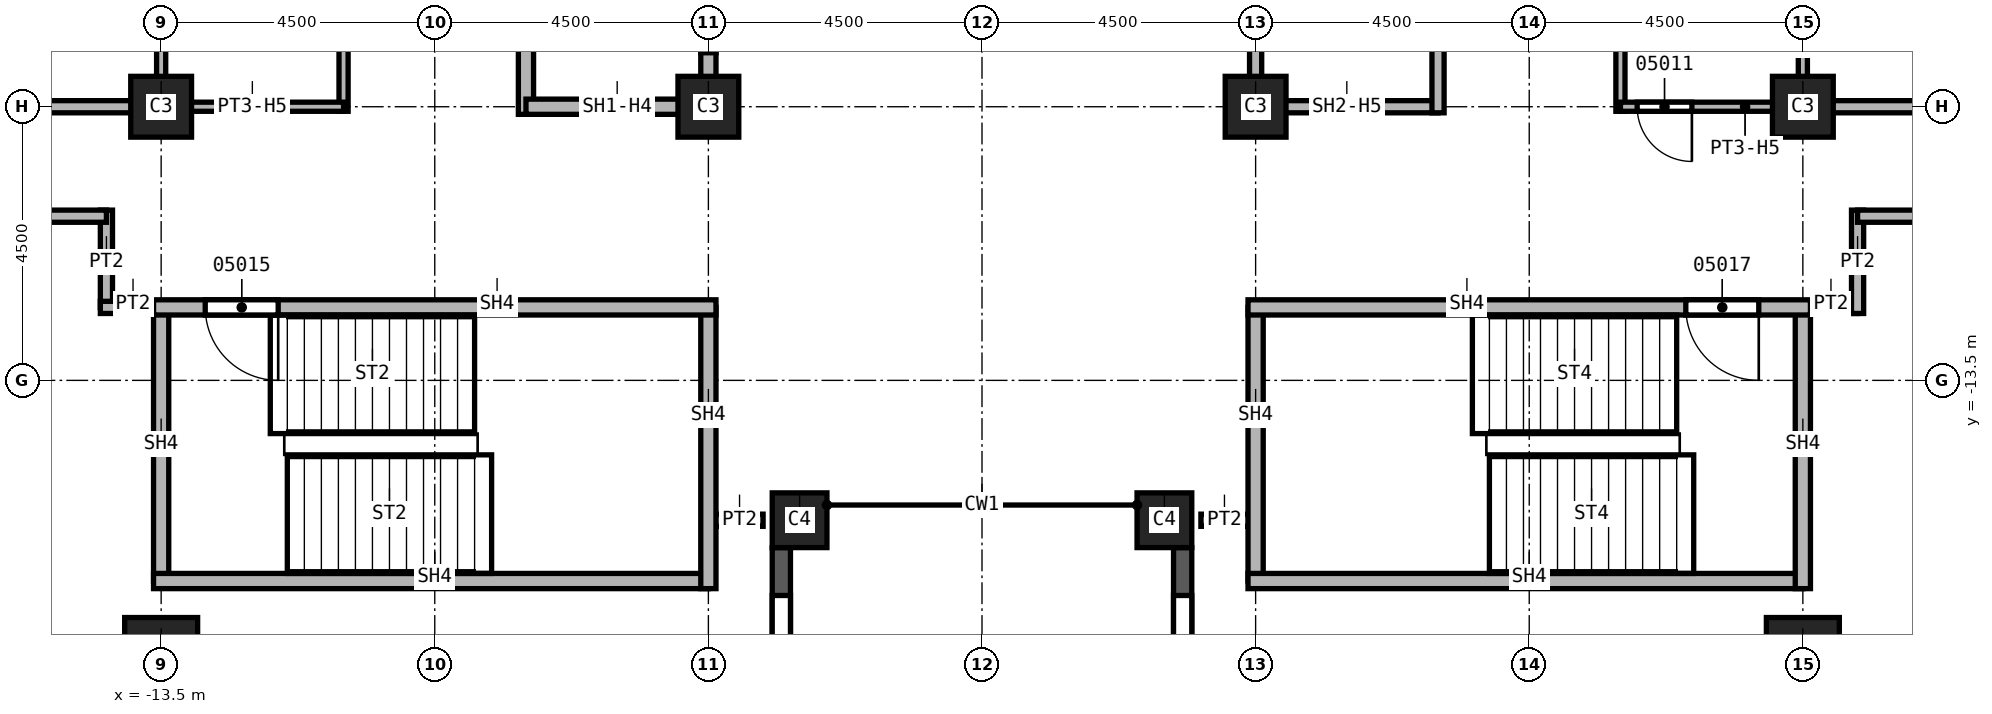
"""IFC4 building model, lengths in metres.
Left out: names, types, materials, properties, quantities, classifications, styles, units other than length and angle.
Written with IfcOpenShell. Run it as: python <this file> out.ifc"""

import sys

from ifc_helpers import new_model, si_unit, direction, frame, frame_2d, origin, origin_2d, place, context, subcontext, project, spatial, rectangle, extrude, element, fill, save


model = new_model("IFC4")
c1 = context("Model", 3, precision=1e-05, world=origin(), true_north=direction((0.0, 1.0)))
c2 = subcontext(c1, "Body", "Model", "MODEL_VIEW")
j1 = project(units=[si_unit("LENGTHUNIT", "METRE"), si_unit("PLANEANGLEUNIT", "RADIAN")], contexts=[c1])
p1 = place(None, origin())
s1 = spatial("IfcSite", under=j1, at=p1, CompositionType="ELEMENT")
p2 = place(p1, origin())
s2 = spatial("IfcBuilding", under=s1, at=p2, CompositionType="ELEMENT")
p3 = place(p2, frame((0.0, 0.0, 112.0)))
s3 = spatial("IfcBuildingStorey", under=s2, at=p3, CompositionType="ELEMENT", Elevation=112.0)
for number, where, z_axis, x_axis in (
    (1, (13.5, -18.0, 0.0), (0.0, 0.0, 1.0), (1.0, 0.0, 0.0)),
    (2, (-13.5, -18.0, 0.0), (0.0, 0.0, 1.0), (1.0, 0.0, 0.0)),
):
    element("IfcColumn", number, at=place(p3, frame(where, z_axis=z_axis, x_axis=x_axis)), inside=s3, PredefinedType="COLUMN", context=c2, shape_type="SweptSolid", body=[
        extrude(rectangle(XDim=1.2, YDim=1.2, at=origin_2d()), origin(), (0.0, 0.0, 1.0), 3.7),
    ])
for number, where, z_axis, x_axis in (
    (3, (4.5, -9.0, 0.0), (0.0, 0.0, 1.0), (1.0, 0.0, 0.0)),
    (4, (13.5, -9.0, 0.0), (0.0, 0.0, 1.0), (1.0, 0.0, 0.0)),
    (5, (-4.5, -9.0, 0.0), (0.0, 0.0, 1.0), (1.0, 0.0, 0.0)),
    (6, (-13.5, -9.0, 0.0), (0.0, 0.0, 1.0), (1.0, 0.0, 0.0)),
):
    element("IfcColumn", number, at=place(p3, frame(where, z_axis=z_axis, x_axis=x_axis)), inside=s3, PredefinedType="COLUMN", context=c2, shape_type="SweptSolid", body=[
        extrude(rectangle(XDim=1.0, YDim=1.0, at=origin_2d()), origin(), (0.0, 0.0, 1.0), 3.7),
    ])
for number, where, z_axis, x_axis in (
    (7, (3.0, -15.8, 0.0), (0.0, 0.0, 1.0), (1.0, 0.0, 0.0)),
    (8, (-3.0, -15.8, 0.0), (0.0, 0.0, 1.0), (1.0, 0.0, 0.0)),
):
    element("IfcColumn", number, at=place(p3, frame(where, z_axis=z_axis, x_axis=x_axis)), inside=s3, PredefinedType="COLUMN", context=c2, shape_type="SweptSolid", body=[
        extrude(rectangle(XDim=0.9, YDim=0.9, at=origin_2d()), origin(), (0.0, 0.0, 1.0), 3.7),
    ])
p4 = place(p3, frame((-3.3, -24.2, 0.0), z_axis=(0.0, 0.0, 1.0), x_axis=(0.0, 1.0, 0.0)))
e9 = element("IfcWall", 9, at=p4, inside=s3, PredefinedType="SOLIDWALL", context=c2, shape_type="SweptSolid", body=[
    extrude(rectangle(XDim=7.95, YDim=0.3, at=frame_2d((3.975, 0.0))), origin(), (0.0, 0.0, 1.0), 3.1),
])
p5 = place(p4, frame((0.788, 0.0, 0.8)))
e10 = element("IfcOpeningElement", 10, at=p5, cuts=e9, PredefinedType="OPENING", context=c2, shape_type="SweptSolid", body=[
    extrude(rectangle(XDim=2.4, YDim=1.95, at=frame_2d((1.2, 0.975))), frame((0.0, 0.15, 0.0), z_axis=(0.0, -1.0, 0.0), x_axis=(1.0, 0.0, 0.0)), (0.0, 0.0, 1.0), 0.3),
])
p6 = place(p4, frame((4.762, 0.0, 0.8)))
e11 = element("IfcOpeningElement", 11, at=p6, cuts=e9, PredefinedType="OPENING", context=c2, shape_type="SweptSolid", body=[
    extrude(rectangle(XDim=2.4, YDim=1.95, at=frame_2d((1.2, 0.975))), frame((0.0, 0.15, 0.0), z_axis=(0.0, -1.0, 0.0), x_axis=(1.0, 0.0, 0.0)), (0.0, 0.0, 1.0), 0.3),
])
p7 = place(p3, frame((3.3, -16.25, 0.0), z_axis=(0.0, 0.0, 1.0), x_axis=(0.0, -1.0, 0.0)))
e12 = element("IfcWall", 12, at=p7, inside=s3, PredefinedType="SOLIDWALL", context=c2, shape_type="SweptSolid", body=[
    extrude(rectangle(XDim=7.95, YDim=0.3, at=frame_2d((3.975, 0.0))), origin(), (0.0, 0.0, 1.0), 3.1),
])
p8 = place(p7, frame((0.788, 0.0, 0.8)))
e13 = element("IfcOpeningElement", 13, at=p8, cuts=e12, PredefinedType="OPENING", context=c2, shape_type="SweptSolid", body=[
    extrude(rectangle(XDim=2.4, YDim=1.95, at=frame_2d((1.2, 0.975))), frame((0.0, 0.15, 0.0), z_axis=(0.0, -1.0, 0.0), x_axis=(1.0, 0.0, 0.0)), (0.0, 0.0, 1.0), 0.3),
])
p9 = place(p7, frame((4.762, 0.0, 0.8)))
e14 = element("IfcOpeningElement", 14, at=p9, cuts=e12, PredefinedType="OPENING", context=c2, shape_type="SweptSolid", body=[
    extrude(rectangle(XDim=2.4, YDim=1.95, at=frame_2d((1.2, 0.975))), frame((0.0, 0.15, 0.0), z_axis=(0.0, -1.0, 0.0), x_axis=(1.0, 0.0, 0.0)), (0.0, 0.0, 1.0), 0.3),
])
p10 = place(p3, frame((-18.0, -9.0, 0.0), z_axis=(0.0, 0.0, 1.0), x_axis=(1.0, 0.0, 0.0)))
e15 = element("IfcWall", 15, at=p10, inside=s3, PredefinedType="PARTITIONING", context=c2, shape_type="SweptSolid", body=[
    extrude(rectangle(XDim=4.5, YDim=0.2, at=frame_2d((2.25, 0.0))), origin(), (0.0, 0.0, 1.0), 3.7),
])
p11 = place(p3, frame((-14.4, -12.3, 0.0), z_axis=(0.0, 0.0, 1.0), x_axis=(0.0, 1.0, 0.0)))
e16 = element("IfcWall", 16, at=p11, inside=s3, PredefinedType="PARTITIONING", context=c2, shape_type="SweptSolid", body=[
    extrude(rectangle(XDim=1.6, YDim=0.2, at=frame_2d((0.8, 0.0))), origin(), (0.0, 0.0, 1.0), 3.7),
])
p12 = place(p3, frame((-14.4, -10.8, 0.0), z_axis=(0.0, 0.0, 1.0), x_axis=(-1.0, 0.0, 0.0)))
e17 = element("IfcWall", 17, at=p12, inside=s3, PredefinedType="PARTITIONING", context=c2, shape_type="SweptSolid", body=[
    extrude(rectangle(XDim=3.6, YDim=0.2, at=frame_2d((1.8, 0.0))), origin(), (0.0, 0.0, 1.0), 3.7),
])
p13 = place(p3, frame((-13.375, -12.3, 0.0), z_axis=(0.0, 0.0, 1.0), x_axis=(-1.0, 0.0, 0.0)))
e18 = element("IfcWall", 18, at=p13, inside=s3, PredefinedType="PARTITIONING", context=c2, shape_type="SweptSolid", body=[
    extrude(rectangle(XDim=1.125, YDim=0.2, at=frame_2d((0.562, 0.0))), origin(), (0.0, 0.0, 1.0), 3.7),
])
for number, where, z_axis, x_axis in (
    (19, (-3.6, -15.8, 0.0), (0.0, 0.0, 1.0), (-1.0, 0.0, 0.0)),
    (20, (4.5, -15.8, 0.0), (0.0, 0.0, 1.0), (-1.0, 0.0, 0.0)),
):
    element("IfcWall", number, at=place(p3, frame(where, z_axis=z_axis, x_axis=x_axis)), inside=s3, PredefinedType="PARTITIONING", context=c2, shape_type="SweptSolid", body=[
        extrude(rectangle(XDim=0.9, YDim=0.2, at=frame_2d((0.45, 0.0))), origin(), (0.0, 0.0, 1.0), 3.7),
    ])
p14 = place(p3, frame((13.5, -9.0, 0.0), z_axis=(0.0, 0.0, 1.0), x_axis=(1.0, 0.0, 0.0)))
e21 = element("IfcWall", 21, at=p14, inside=s3, PredefinedType="PARTITIONING", context=c2, shape_type="SweptSolid", body=[
    extrude(rectangle(XDim=4.5, YDim=0.2, at=frame_2d((2.25, 0.0))), origin(), (0.0, 0.0, 1.0), 3.7),
])
p15 = place(p3, frame((14.4, -12.3, 0.0), z_axis=(0.0, 0.0, 1.0), x_axis=(-1.0, 0.0, 0.0)))
e22 = element("IfcWall", 22, at=p15, inside=s3, PredefinedType="PARTITIONING", context=c2, shape_type="SweptSolid", body=[
    extrude(rectangle(XDim=1.025, YDim=0.2, at=frame_2d((0.512, 0.0))), origin(), (0.0, 0.0, 1.0), 3.7),
])
p16 = place(p3, frame((14.4, -10.7, 0.0), z_axis=(0.0, 0.0, 1.0), x_axis=(0.0, -1.0, 0.0)))
e23 = element("IfcWall", 23, at=p16, inside=s3, PredefinedType="PARTITIONING", context=c2, shape_type="SweptSolid", body=[
    extrude(rectangle(XDim=1.7, YDim=0.2, at=frame_2d((0.85, 0.0))), origin(), (0.0, 0.0, 1.0), 3.7),
])
p17 = place(p3, frame((18.0, -10.8, 0.0), z_axis=(0.0, 0.0, 1.0), x_axis=(-1.0, 0.0, 0.0)))
e24 = element("IfcWall", 24, at=p17, inside=s3, PredefinedType="PARTITIONING", context=c2, shape_type="SweptSolid", body=[
    extrude(rectangle(XDim=3.6, YDim=0.2, at=frame_2d((1.8, 0.0))), origin(), (0.0, 0.0, 1.0), 3.7),
])
p18 = place(p3, frame((4.5, -9.1, 0.0), z_axis=(0.0, 0.0, 1.0), x_axis=(0.0, 1.0, 0.0)))
e25 = element("IfcWall", 25, at=p18, inside=s3, PredefinedType="SOLIDWALL", context=c2, shape_type="SweptSolid", body=[
    extrude(rectangle(XDim=9.1, YDim=0.2, at=frame_2d((4.55, 0.0))), origin(), (0.0, 0.0, 1.0), 2.938),
])
p19 = place(p18, frame((2.2, 0.0, 0.0)))
e26 = element("IfcOpeningElement", 26, at=p19, cuts=e25, PredefinedType="OPENING", context=c2, shape_type="SweptSolid", body=[
    extrude(rectangle(XDim=1.1, YDim=2.1, at=frame_2d((0.55, 1.05))), frame((0.0, 0.1, 0.0), z_axis=(0.0, -1.0, 0.0), x_axis=(1.0, 0.0, 0.0)), (0.0, 0.0, 1.0), 0.2),
])
p20 = place(p3, frame((7.5, -9.0, 0.0), z_axis=(0.0, 0.0, 1.0), x_axis=(-1.0, 0.0, 0.0)))
e27 = element("IfcWall", 27, at=p20, inside=s3, PredefinedType="SOLIDWALL", context=c2, shape_type="SweptSolid", body=[
    extrude(rectangle(XDim=3.0, YDim=0.2, at=frame_2d((1.5, 0.0))), origin(), (0.0, 0.0, 1.0), 2.938),
])
p21 = place(p3, frame((7.5, -2.875, 0.0), z_axis=(0.0, 0.0, 1.0), x_axis=(0.0, -1.0, 0.0)))
e28 = element("IfcWall", 28, at=p21, inside=s3, PredefinedType="SOLIDWALL", context=c2, shape_type="SweptSolid", body=[
    extrude(rectangle(XDim=6.225, YDim=0.2, at=frame_2d((3.113, 0.0))), origin(), (0.0, 0.0, 1.0), 3.7),
])
p22 = place(p3, frame((-7.5, -9.125, 0.0), z_axis=(0.0, 0.0, 1.0), x_axis=(0.0, 1.0, 0.0)))
e29 = element("IfcWall", 29, at=p22, inside=s3, PredefinedType="SOLIDWALL", context=c2, shape_type="SweptSolid", body=[
    extrude(rectangle(XDim=12.25, YDim=0.25, at=frame_2d((6.125, 0.0))), origin(), (0.0, 0.0, 1.0), 3.7),
])
p23 = place(p3, frame((-4.5, -9.0, 0.0), z_axis=(0.0, 0.0, 1.0), x_axis=(-1.0, 0.0, 0.0)))
e30 = element("IfcWall", 30, at=p23, inside=s3, PredefinedType="SOLIDWALL", context=c2, shape_type="SweptSolid", body=[
    extrude(rectangle(XDim=3.0, YDim=0.25, at=frame_2d((1.5, 0.0))), origin(), (0.0, 0.0, 1.0), 2.938),
])
p24 = place(p3, frame((-4.5, 0.0, 0.0), z_axis=(0.0, 0.0, 1.0), x_axis=(0.0, -1.0, 0.0)))
e31 = element("IfcWall", 31, at=p24, inside=s3, PredefinedType="SOLIDWALL", context=c2, shape_type="SweptSolid", body=[
    extrude(rectangle(XDim=9.125, YDim=0.25, at=frame_2d((4.562, 0.0))), origin(), (0.0, 0.0, 1.0), 2.938),
])
p25 = place(p24, frame((7.012, 0.0, 0.0)))
e32 = element("IfcOpeningElement", 32, at=p25, cuts=e31, PredefinedType="OPENING", context=c2, shape_type="SweptSolid", body=[
    extrude(rectangle(XDim=1.1, YDim=2.1, at=frame_2d((0.55, 1.05))), frame((0.0, 0.125, 0.0), z_axis=(0.0, -1.0, 0.0), x_axis=(1.0, 0.0, 0.0)), (0.0, 0.0, 1.0), 0.25),
])
p26 = place(p24, frame((3.95, 0.0, 0.0)))
e33 = element("IfcOpeningElement", 33, at=p26, cuts=e31, PredefinedType="OPENING", context=c2, shape_type="SweptSolid", body=[
    extrude(rectangle(XDim=1.1, YDim=2.1, at=frame_2d((0.55, 1.05))), frame((0.0, 0.125, 0.0), z_axis=(0.0, -1.0, 0.0), x_axis=(1.0, 0.0, 0.0)), (0.0, 0.0, 1.0), 0.25),
])
p27 = place(p24, frame((0.95, 0.0, 0.0)))
e34 = element("IfcOpeningElement", 34, at=p27, cuts=e31, PredefinedType="OPENING", context=c2, shape_type="SweptSolid", body=[
    extrude(rectangle(XDim=1.1, YDim=2.1, at=frame_2d((0.55, 1.05))), frame((0.0, 0.125, 0.0), z_axis=(0.0, -1.0, 0.0), x_axis=(1.0, 0.0, 0.0)), (0.0, 0.0, 1.0), 0.25),
])
p28 = place(p3, frame((-13.5, -16.8, 0.0), z_axis=(0.0, 0.0, 1.0), x_axis=(0.0, 1.0, 0.0)))
e35 = element("IfcWall", 35, at=p28, inside=s3, PredefinedType="SOLIDWALL", context=c2, shape_type="SweptSolid", body=[
    extrude(rectangle(XDim=4.5, YDim=0.25, at=frame_2d((2.25, 0.0))), origin(), (0.0, 0.0, 1.0), 3.7),
])
p29 = place(p3, frame((-4.5, -16.8, 0.0), z_axis=(0.0, 0.0, 1.0), x_axis=(-1.0, 0.0, 0.0)))
e36 = element("IfcWall", 36, at=p29, inside=s3, PredefinedType="SOLIDWALL", context=c2, shape_type="SweptSolid", body=[
    extrude(rectangle(XDim=9.125, YDim=0.25, at=frame_2d((4.562, 0.0))), origin(), (0.0, 0.0, 1.0), 3.7),
])
p30 = place(p3, frame((-4.5, -12.3, 0.0), z_axis=(0.0, 0.0, 1.0), x_axis=(0.0, -1.0, 0.0)))
e37 = element("IfcWall", 37, at=p30, inside=s3, PredefinedType="SOLIDWALL", context=c2, shape_type="SweptSolid", body=[
    extrude(rectangle(XDim=4.625, YDim=0.25, at=frame_2d((2.312, 0.0))), origin(), (0.0, 0.0, 1.0), 3.7),
])
p31 = place(p3, frame((-4.375, -12.3, 0.0), z_axis=(0.0, 0.0, 1.0), x_axis=(-1.0, 0.0, 0.0)))
e38 = element("IfcWall", 38, at=p31, inside=s3, PredefinedType="SOLIDWALL", context=c2, shape_type="SweptSolid", body=[
    extrude(rectangle(XDim=9.25, YDim=0.25, at=frame_2d((4.625, 0.0))), origin(), (0.0, 0.0, 1.0), 3.7),
])
p32 = place(p31, frame((7.2, 0.0, 0.0)))
e39 = element("IfcOpeningElement", 39, at=p32, cuts=e38, PredefinedType="OPENING", context=c2, shape_type="SweptSolid", body=[
    extrude(rectangle(XDim=1.2, YDim=2.1, at=frame_2d((0.6, 1.05))), frame((0.0, 0.125, 0.0), z_axis=(0.0, -1.0, 0.0), x_axis=(1.0, 0.0, 0.0)), (0.0, 0.0, 1.0), 0.25),
])
p33 = place(p3, frame((4.5, -16.8, 0.0), z_axis=(0.0, 0.0, 1.0), x_axis=(0.0, 1.0, 0.0)))
e40 = element("IfcWall", 40, at=p33, inside=s3, PredefinedType="SOLIDWALL", context=c2, shape_type="SweptSolid", body=[
    extrude(rectangle(XDim=4.5, YDim=0.25, at=frame_2d((2.25, 0.0))), origin(), (0.0, 0.0, 1.0), 3.7),
])
p34 = place(p3, frame((13.5, -16.8, 0.0), z_axis=(0.0, 0.0, 1.0), x_axis=(-1.0, 0.0, 0.0)))
e41 = element("IfcWall", 41, at=p34, inside=s3, PredefinedType="SOLIDWALL", context=c2, shape_type="SweptSolid", body=[
    extrude(rectangle(XDim=9.125, YDim=0.25, at=frame_2d((4.562, 0.0))), origin(), (0.0, 0.0, 1.0), 3.7),
])
p35 = place(p3, frame((13.5, -12.3, 0.0), z_axis=(0.0, 0.0, 1.0), x_axis=(0.0, -1.0, 0.0)))
e42 = element("IfcWall", 42, at=p35, inside=s3, PredefinedType="SOLIDWALL", context=c2, shape_type="SweptSolid", body=[
    extrude(rectangle(XDim=4.625, YDim=0.25, at=frame_2d((2.312, 0.0))), origin(), (0.0, 0.0, 1.0), 3.7),
])
p36 = place(p3, frame((13.625, -12.3, 0.0), z_axis=(0.0, 0.0, 1.0), x_axis=(-1.0, 0.0, 0.0)))
e43 = element("IfcWall", 43, at=p36, inside=s3, PredefinedType="SOLIDWALL", context=c2, shape_type="SweptSolid", body=[
    extrude(rectangle(XDim=9.25, YDim=0.25, at=frame_2d((4.625, 0.0))), origin(), (0.0, 0.0, 1.0), 3.7),
])
p37 = place(p36, frame((0.85, 0.0, 0.0)))
e44 = element("IfcOpeningElement", 44, at=p37, cuts=e43, PredefinedType="OPENING", context=c2, shape_type="SweptSolid", body=[
    extrude(rectangle(XDim=1.2, YDim=2.1, at=frame_2d((0.6, 1.05))), frame((0.0, 0.125, 0.0), z_axis=(0.0, -1.0, 0.0), x_axis=(1.0, 0.0, 0.0)), (0.0, 0.0, 1.0), 0.25),
])
p38 = place(p3, frame((-13.5, -9.1, 0.0), z_axis=(0.0, 0.0, 1.0), x_axis=(0.0, 1.0, 0.0)))
e45 = element("IfcWall", 45, at=p38, inside=s3, PredefinedType="PARTITIONING", context=c2, shape_type="SweptSolid", body=[
    extrude(rectangle(XDim=4.7, YDim=0.15, at=frame_2d((2.35, 0.0))), origin(), (0.0, 0.0, 1.0), 2.938),
])
p39 = place(p3, frame((-10.5, -9.075, 0.0), z_axis=(0.0, 0.0, 1.0), x_axis=(0.0, 1.0, 0.0)))
e46 = element("IfcWall", 46, at=p39, inside=s3, PredefinedType="PARTITIONING", context=c2, shape_type="SweptSolid", body=[
    extrude(rectangle(XDim=4.65, YDim=0.15, at=frame_2d((2.325, 0.0))), origin(), (0.0, 0.0, 1.0), 3.7),
])
p40 = place(p39, frame((3.4, 0.0, 0.0)))
e47 = element("IfcOpeningElement", 47, at=p40, cuts=e46, PredefinedType="OPENING", context=c2, shape_type="SweptSolid", body=[
    extrude(rectangle(XDim=0.9, YDim=2.1, at=frame_2d((0.45, 1.05))), frame((0.0, 0.075, 0.0), z_axis=(0.0, -1.0, 0.0), x_axis=(1.0, 0.0, 0.0)), (0.0, 0.0, 1.0), 0.15),
])
p41 = place(p3, frame((-10.5, -9.0, 0.0), z_axis=(0.0, 0.0, 1.0), x_axis=(-1.0, 0.0, 0.0)))
e48 = element("IfcWall", 48, at=p41, inside=s3, PredefinedType="PARTITIONING", context=c2, shape_type="SweptSolid", body=[
    extrude(rectangle(XDim=3.075, YDim=0.15, at=frame_2d((1.538, 0.0))), origin(), (0.0, 0.0, 1.0), 2.938),
])
p42 = place(p3, frame((10.5, -6.925, 0.0), z_axis=(0.0, 0.0, 1.0), x_axis=(0.0, -1.0, 0.0)))
e49 = element("IfcWall", 49, at=p42, inside=s3, PredefinedType="PARTITIONING", context=c2, shape_type="SweptSolid", body=[
    extrude(rectangle(XDim=2.15, YDim=0.15, at=frame_2d((1.075, 0.0))), origin(), (0.0, 0.0, 1.0), 3.7),
])
p43 = place(p3, frame((13.5, -7.0, 0.0), z_axis=(0.0, 0.0, 1.0), x_axis=(0.0, -1.0, 0.0)))
e50 = element("IfcWall", 50, at=p43, inside=s3, PredefinedType="PARTITIONING", context=c2, shape_type="SweptSolid", body=[
    extrude(rectangle(XDim=2.1, YDim=0.15, at=frame_2d((1.05, 0.0))), origin(), (0.0, 0.0, 1.0), 2.938),
])
p44 = place(p3, frame((13.575, -9.0, 0.0), z_axis=(0.0, 0.0, 1.0), x_axis=(-1.0, 0.0, 0.0)))
e51 = element("IfcWall", 51, at=p44, inside=s3, PredefinedType="PARTITIONING", context=c2, shape_type="SweptSolid", body=[
    extrude(rectangle(XDim=3.075, YDim=0.15, at=frame_2d((1.538, 0.0))), origin(), (0.0, 0.0, 1.0), 2.938),
])
p45 = place(p44, frame((1.9, 0.0, 0.0)))
e52 = element("IfcOpeningElement", 52, at=p45, cuts=e51, PredefinedType="OPENING", context=c2, shape_type="SweptSolid", body=[
    extrude(rectangle(XDim=0.9, YDim=2.1, at=frame_2d((0.45, 1.05))), frame((0.0, 0.075, 0.0), z_axis=(0.0, -1.0, 0.0), x_axis=(1.0, 0.0, 0.0)), (0.0, 0.0, 1.0), 0.15),
])
p46 = place(p6, origin())
e53 = element("IfcWindow", 53, at=p46, inside=s3, PartitioningType="SINGLE_PANEL", PredefinedType="WINDOW", context=c2, shape_type="SweptSolid", body=[
    extrude(rectangle(XDim=2.4, YDim=1.95, at=frame_2d((1.2, 0.975))), frame((0.0, 0.03, 0.0), z_axis=(0.0, -1.0, 0.0), x_axis=(1.0, 0.0, 0.0)), (0.0, 0.0, 1.0), 0.06),
])
fill(e11, e53)
p47 = place(p8, origin())
e54 = element("IfcWindow", 54, at=p47, inside=s3, PartitioningType="SINGLE_PANEL", PredefinedType="WINDOW", context=c2, shape_type="SweptSolid", body=[
    extrude(rectangle(XDim=2.4, YDim=1.95, at=frame_2d((1.2, 0.975))), frame((0.0, 0.03, 0.0), z_axis=(0.0, -1.0, 0.0), x_axis=(1.0, 0.0, 0.0)), (0.0, 0.0, 1.0), 0.06),
])
fill(e13, e54)
p48 = place(p45, origin())
e55 = element("IfcDoor", 55, at=p48, inside=s3, OperationType="SINGLE_SWING_RIGHT", PredefinedType="DOOR", context=c2, shape_type="SweptSolid", body=[
    extrude(rectangle(XDim=0.9, YDim=2.1, at=frame_2d((0.45, 1.05))), frame((0.0, 0.025, 0.0), z_axis=(0.0, -1.0, 0.0), x_axis=(1.0, 0.0, 0.0)), (0.0, 0.0, 1.0), 0.05),
])
fill(e52, e55)
p49 = place(p32, origin())
e56 = element("IfcDoor", 56, at=p49, inside=s3, OperationType="SINGLE_SWING_RIGHT", PredefinedType="DOOR", context=c2, shape_type="SweptSolid", body=[
    extrude(rectangle(XDim=1.2, YDim=2.1, at=frame_2d((0.6, 1.05))), frame((0.0, 0.025, 0.0), z_axis=(0.0, -1.0, 0.0), x_axis=(1.0, 0.0, 0.0)), (0.0, 0.0, 1.0), 0.05),
])
fill(e39, e56)
p50 = place(p37, origin())
e57 = element("IfcDoor", 57, at=p50, inside=s3, OperationType="SINGLE_SWING_RIGHT", PredefinedType="DOOR", context=c2, shape_type="SweptSolid", body=[
    extrude(rectangle(XDim=1.2, YDim=2.1, at=frame_2d((0.6, 1.05))), frame((0.0, 0.025, 0.0), z_axis=(0.0, -1.0, 0.0), x_axis=(1.0, 0.0, 0.0)), (0.0, 0.0, 1.0), 0.05),
])
fill(e44, e57)
p51 = place(p25, origin())
e58 = element("IfcDoor", 58, at=p51, inside=s3, OperationType="SLIDING_TO_LEFT", PredefinedType="DOOR", context=c2, shape_type="SweptSolid", body=[
    extrude(rectangle(XDim=1.1, YDim=2.1, at=frame_2d((0.55, 1.05))), frame((0.0, 0.025, 0.0), z_axis=(0.0, -1.0, 0.0), x_axis=(1.0, 0.0, 0.0)), (0.0, 0.0, 1.0), 0.05),
])
fill(e32, e58)
save(model, sys.argv[1])
